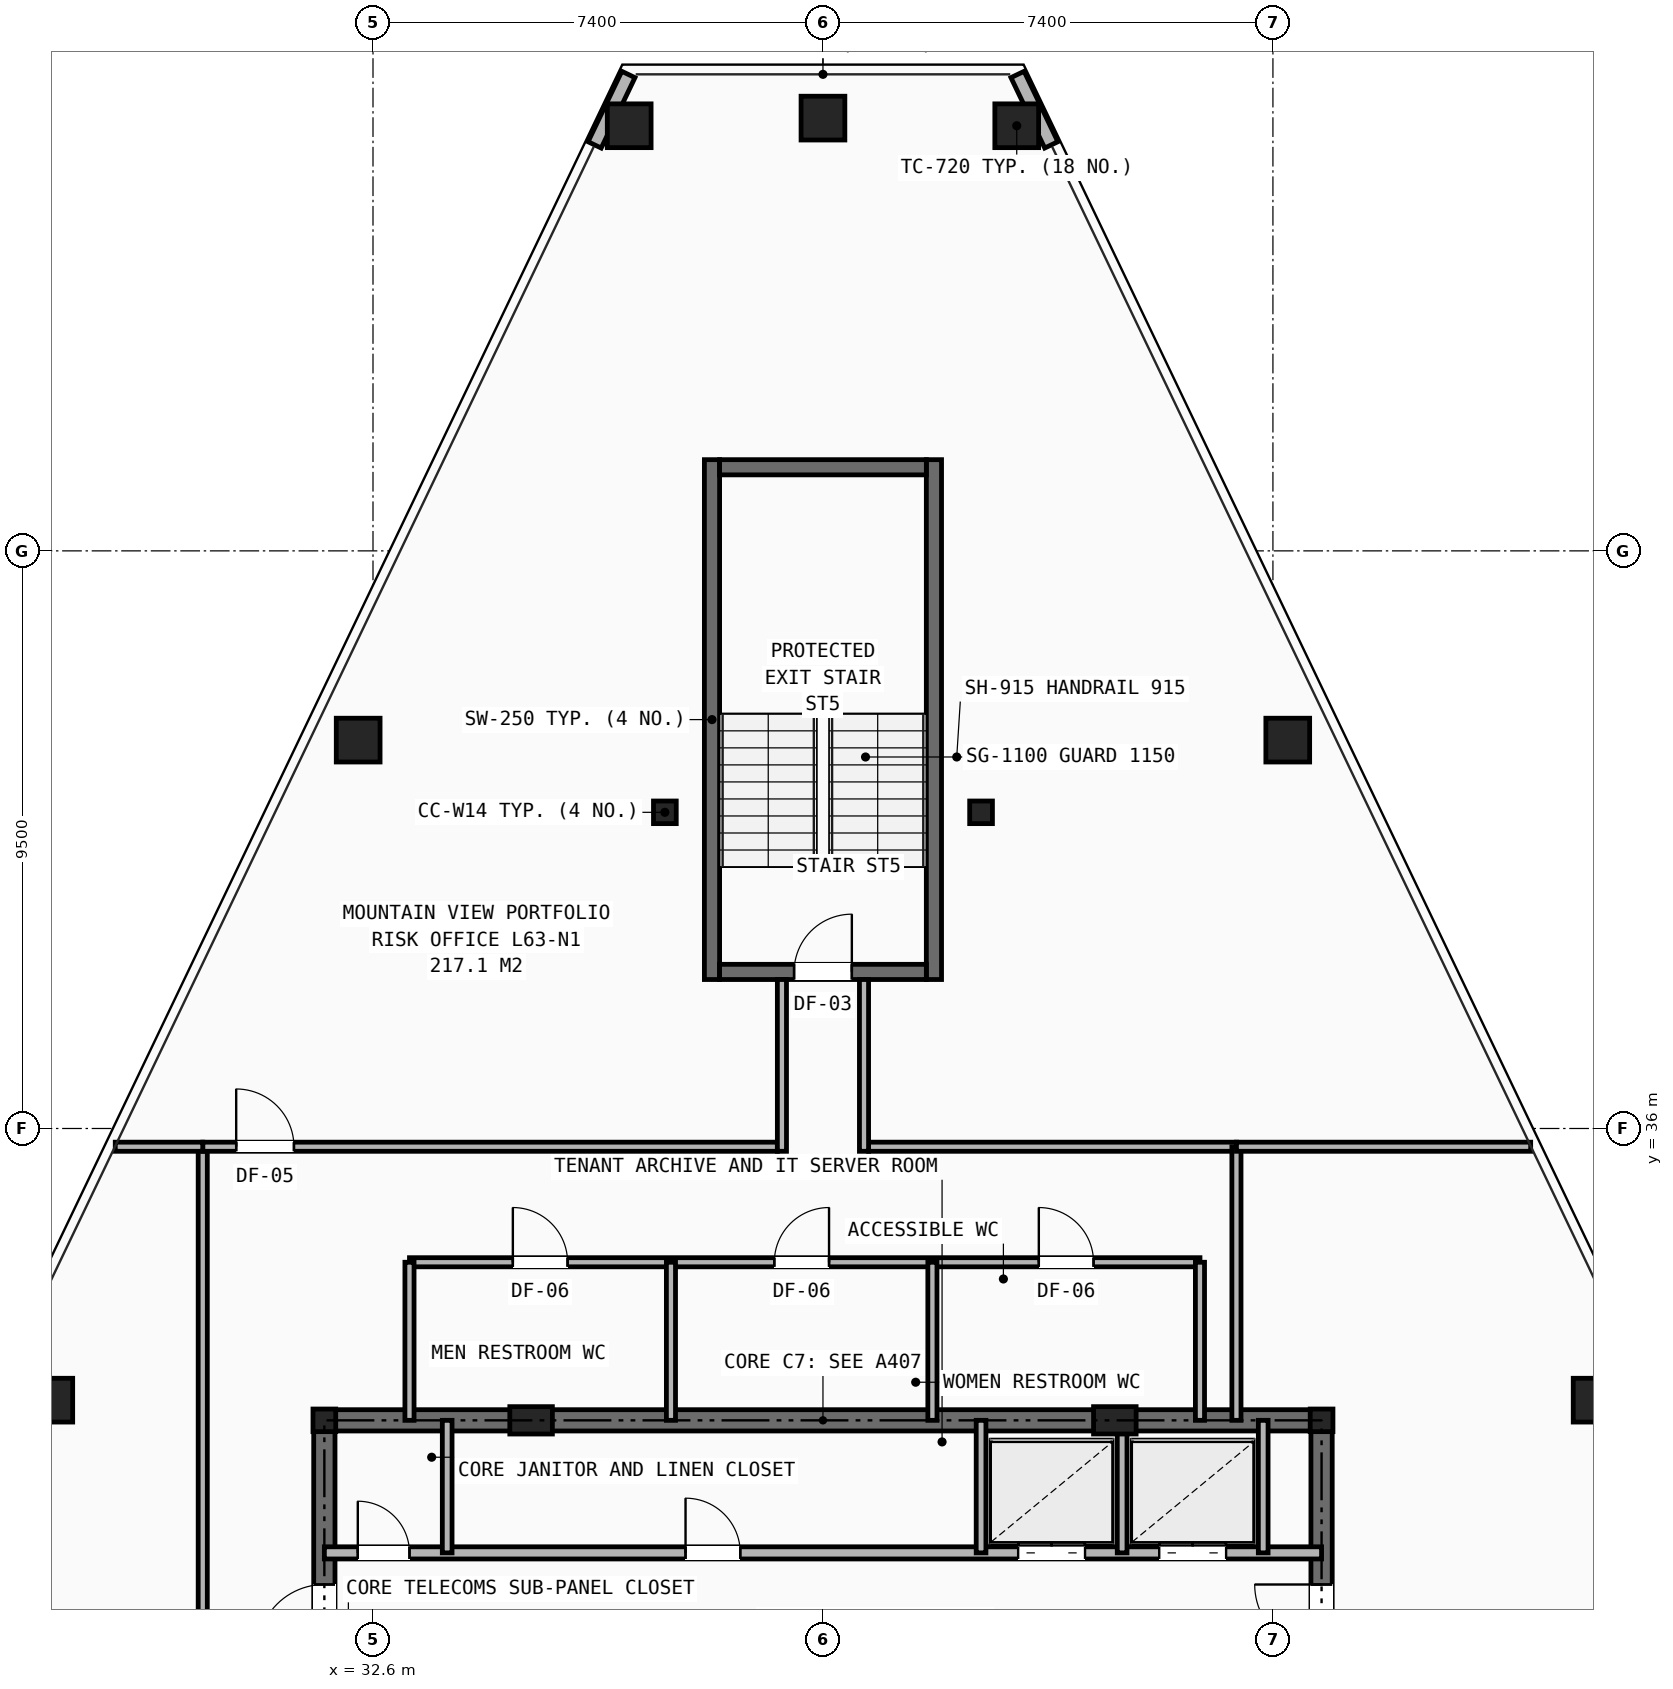
"""IFC4 building model, lengths in metres.
Left out: names, types, materials, properties, quantities, classifications, styles, units other than length and angle.
Written with IfcOpenShell. Run it as: python <this file> out.ifc"""

import sys

from ifc_helpers import new_model, si_unit, direction, frame, frame_2d, origin, origin_2d, place, context, subcontext, project, spatial, rectangle, hollow_rectangle, i_section, extrude, element, fill, save


model = new_model("IFC4")
c1 = context("Model", 3, precision=1e-05, world=origin(), true_north=direction((0.0, 1.0)))
c2 = subcontext(c1, "Body", "Model", "MODEL_VIEW")
j1 = project(units=[si_unit("LENGTHUNIT", "METRE"), si_unit("PLANEANGLEUNIT", "RADIAN")], contexts=[c1])
p1 = place(None, origin())
s1 = spatial("IfcSite", under=j1, at=p1, CompositionType="ELEMENT")
p2 = place(p1, origin())
s2 = spatial("IfcBuilding", under=s1, at=p2, CompositionType="ELEMENT")
p3 = place(p2, frame((0.0, 0.0, 222.4)))
s3 = spatial("IfcBuildingStorey", under=s2, at=p3, CompositionType="ELEMENT", Elevation=222.4)
for number, where, z_axis, x_axis in (
    (1, (31.8, 31.2, 0.0), (0.0, 0.0, 1.0), (1.0, 0.0, 0.0)),
    (2, (48.2, 31.2, 0.0), (0.0, 0.0, 1.0), (1.0, 0.0, 0.0)),
    (3, (37.4, 41.2, 0.0), (0.0, 0.0, 1.0), (1.0, 0.0, 0.0)),
    (4, (42.6, 41.2, 0.0), (0.0, 0.0, 1.0), (1.0, 0.0, 0.0)),
):
    element("IfcColumn", number, at=place(p3, frame(where, z_axis=z_axis, x_axis=x_axis)), inside=s3, PredefinedType="COLUMN", context=c2, shape_type="SweptSolid", body=[
        extrude(i_section(OverallWidth=0.374, OverallDepth=0.372, WebThickness=0.016, FlangeThickness=0.026, at=origin_2d()), origin(), (0.0, 0.0, 1.0), 3.5),
    ])
for number, where, z_axis, x_axis in (
    (5, (35.2, 31.2, 0.0), (0.0, 0.0, 1.0), (1.0, 0.0, 0.0)),
    (6, (44.8, 31.2, 0.0), (0.0, 0.0, 1.0), (1.0, 0.0, 0.0)),
):
    element("IfcColumn", number, at=place(p3, frame(where, z_axis=z_axis, x_axis=x_axis)), inside=s3, PredefinedType="PILASTER", context=c2, shape_type="SweptSolid", body=[
        extrude(rectangle(XDim=0.7, YDim=0.45, at=origin_2d()), origin(), (0.0, 0.0, 1.0), 3.5),
    ])
for number, where, z_axis, x_axis in (
    (7, (43.187, 52.492, 0.0), (0.0, 0.0, 1.0), (1.0, 0.0, 0.0)),
    (8, (40.0, 52.617, 0.0), (0.0, 0.0, 1.0), (1.0, 0.0, 0.0)),
    (9, (36.813, 52.492, 0.0), (0.0, 0.0, 1.0), (1.0, 0.0, 0.0)),
    (10, (32.356, 42.388, 0.0), (0.0, 0.0, 1.0), (1.0, 0.0, 0.0)),
    (11, (27.301, 31.532, 0.0), (0.0, 0.0, 1.0), (1.0, 0.0, 0.0)),
    (12, (52.699, 31.532, 0.0), (0.0, 0.0, 1.0), (1.0, 0.0, 0.0)),
    (13, (47.644, 42.388, 0.0), (0.0, 0.0, 1.0), (1.0, 0.0, 0.0)),
):
    element("IfcColumn", number, at=place(p3, frame(where, z_axis=z_axis, x_axis=x_axis)), inside=s3, PredefinedType="COLUMN", context=c2, shape_type="SweptSolid", body=[
        extrude(hollow_rectangle(XDim=0.72, YDim=0.72, WallThickness=0.05, at=origin_2d()), origin(), (0.0, 0.0, 1.0), 3.5),
    ])
for number, where, z_axis, x_axis in (
    (14, (36.8, 53.335, 0.0), (0.0, 0.0, 1.0), (-0.432, -0.902, 0.0)),
    (15, (43.755, 52.177, 0.0), (0.0, 0.0, 1.0), (-0.432, 0.902, 0.0)),
):
    element("IfcWall", number, at=place(p3, frame(where, z_axis=z_axis, x_axis=x_axis)), inside=s3, PredefinedType="SHEAR", context=c2, shape_type="SweptSolid", body=[
        extrude(rectangle(XDim=1.284, YDim=0.24, at=frame_2d((0.642, 0.0))), origin(), (0.0, 0.0, 1.0), 2.623),
    ])
p4 = place(p3, frame((31.8, 31.2, 0.0), z_axis=(0.0, 0.0, 1.0), x_axis=(1.0, 0.0, 0.0)))
e16 = element("IfcWall", 16, at=p4, inside=s3, PredefinedType="SHEAR", context=c2, shape_type="SweptSolid", body=[
    extrude(rectangle(XDim=16.4, YDim=0.35, at=frame_2d((8.2, 0.0))), origin(), (0.0, 0.0, 1.0), 3.25),
])
p5 = place(p3, frame((31.8, 16.4, 0.0), z_axis=(0.0, 0.0, 1.0), x_axis=(0.0, 1.0, 0.0)))
e17 = element("IfcWall", 17, at=p5, inside=s3, PredefinedType="SHEAR", context=c2, shape_type="SweptSolid", body=[
    extrude(rectangle(XDim=14.8, YDim=0.35, at=frame_2d((7.4, 0.0))), origin(), (0.0, 0.0, 1.0), 3.25),
])
p6 = place(p5, frame((11.0, 0.0, 0.0)))
e18 = element("IfcOpeningElement", 18, at=p6, cuts=e17, PredefinedType="OPENING", context=c2, shape_type="SweptSolid", body=[
    extrude(rectangle(XDim=1.1, YDim=2.15, at=frame_2d((0.55, 1.075))), frame((0.0, 0.185, 0.0), z_axis=(0.0, -1.0, 0.0), x_axis=(1.0, 0.0, 0.0)), (0.0, 0.0, 1.0), 0.37),
])
p7 = place(p3, frame((48.2, 16.4, 0.0), z_axis=(0.0, 0.0, 1.0), x_axis=(0.0, 1.0, 0.0)))
e19 = element("IfcWall", 19, at=p7, inside=s3, PredefinedType="SHEAR", context=c2, shape_type="SweptSolid", body=[
    extrude(rectangle(XDim=14.8, YDim=0.35, at=frame_2d((7.4, 0.0))), origin(), (0.0, 0.0, 1.0), 3.25),
])
p8 = place(p7, frame((11.0, 0.0, 0.0)))
e20 = element("IfcOpeningElement", 20, at=p8, cuts=e19, PredefinedType="OPENING", context=c2, shape_type="SweptSolid", body=[
    extrude(rectangle(XDim=1.1, YDim=2.15, at=frame_2d((0.55, 1.075))), frame((0.0, 0.185, 0.0), z_axis=(0.0, -1.0, 0.0), x_axis=(1.0, 0.0, 0.0)), (0.0, 0.0, 1.0), 0.37),
])
p9 = place(p3, frame((31.8, 29.02, 0.0), z_axis=(0.0, 0.0, 1.0), x_axis=(1.0, 0.0, 0.0)))
e21 = element("IfcWall", 21, at=p9, inside=s3, PredefinedType="SOLIDWALL", context=c2, shape_type="SweptSolid", body=[
    extrude(rectangle(XDim=16.4, YDim=0.2, at=frame_2d((8.2, 0.0))), origin(), (0.0, 0.0, 1.0), 2.705),
])
p10 = place(p9, frame((0.55, 0.0, 0.0)))
e22 = element("IfcOpeningElement", 22, at=p10, cuts=e21, PredefinedType="OPENING", context=c2, shape_type="SweptSolid", body=[
    extrude(rectangle(XDim=0.85, YDim=2.05, at=frame_2d((0.425, 1.025))), frame((0.0, 0.11, 0.0), z_axis=(0.0, -1.0, 0.0), x_axis=(1.0, 0.0, 0.0)), (0.0, 0.0, 1.0), 0.22),
])
p11 = place(p9, frame((5.94, 0.0, 0.0)))
e23 = element("IfcOpeningElement", 23, at=p11, cuts=e21, PredefinedType="OPENING", context=c2, shape_type="SweptSolid", body=[
    extrude(rectangle(XDim=0.9, YDim=2.1, at=frame_2d((0.45, 1.05))), frame((0.0, 0.11, 0.0), z_axis=(0.0, -1.0, 0.0), x_axis=(1.0, 0.0, 0.0)), (0.0, 0.0, 1.0), 0.22),
])
p12 = place(p9, frame((11.41, 0.0, 0.0)))
e24 = element("IfcOpeningElement", 24, at=p12, cuts=e21, PredefinedType="OPENING", context=c2, shape_type="SweptSolid", body=[
    extrude(rectangle(XDim=1.1, YDim=2.15, at=frame_2d((0.55, 1.075))), frame((0.0, 0.11, 0.0), z_axis=(0.0, -1.0, 0.0), x_axis=(1.0, 0.0, 0.0)), (0.0, 0.0, 1.0), 0.22),
])
p13 = place(p9, frame((13.73, 0.0, 0.0)))
e25 = element("IfcOpeningElement", 25, at=p13, cuts=e21, PredefinedType="OPENING", context=c2, shape_type="SweptSolid", body=[
    extrude(rectangle(XDim=1.1, YDim=2.15, at=frame_2d((0.55, 1.075))), frame((0.0, 0.11, 0.0), z_axis=(0.0, -1.0, 0.0), x_axis=(1.0, 0.0, 0.0)), (0.0, 0.0, 1.0), 0.22),
])
for number, where, z_axis, x_axis in (
    (26, (33.82, 29.02, 0.0), (0.0, 0.0, 1.0), (0.0, 1.0, 0.0)),
    (27, (42.6, 29.02, 0.0), (0.0, 0.0, 1.0), (0.0, 1.0, 0.0)),
    (28, (44.92, 29.02, 0.0), (0.0, 0.0, 1.0), (0.0, 1.0, 0.0)),
    (29, (47.24, 29.02, 0.0), (0.0, 0.0, 1.0), (0.0, 1.0, 0.0)),
):
    element("IfcWall", number, at=place(p3, frame(where, z_axis=z_axis, x_axis=x_axis)), inside=s3, PredefinedType="SOLIDWALL", context=c2, shape_type="SweptSolid", body=[
        extrude(rectangle(XDim=2.18, YDim=0.16, at=frame_2d((1.09, 0.0))), origin(), (0.0, 0.0, 1.0), 2.705),
    ])
p14 = place(p3, frame((33.2, 33.8, 0.0), z_axis=(0.0, 0.0, 1.0), x_axis=(1.0, 0.0, 0.0)))
e30 = element("IfcWall", 30, at=p14, inside=s3, PredefinedType="PARTITIONING", context=c2, shape_type="SweptSolid", body=[
    extrude(rectangle(XDim=13.0, YDim=0.15, at=frame_2d((6.5, 0.0))), origin(), (0.0, 0.0, 1.0), 3.25),
])
p15 = place(p14, frame((1.7, 0.0, 0.0)))
e31 = element("IfcOpeningElement", 31, at=p15, cuts=e30, PredefinedType="OPENING", context=c2, shape_type="SweptSolid", body=[
    extrude(rectangle(XDim=0.9, YDim=2.1, at=frame_2d((0.45, 1.05))), frame((0.0, 0.085, 0.0), z_axis=(0.0, -1.0, 0.0), x_axis=(1.0, 0.0, 0.0)), (0.0, 0.0, 1.0), 0.17),
])
p16 = place(p14, frame((6.0, 0.0, 0.0)))
e32 = element("IfcOpeningElement", 32, at=p16, cuts=e30, PredefinedType="OPENING", context=c2, shape_type="SweptSolid", body=[
    extrude(rectangle(XDim=0.9, YDim=2.1, at=frame_2d((0.45, 1.05))), frame((0.0, 0.085, 0.0), z_axis=(0.0, -1.0, 0.0), x_axis=(1.0, 0.0, 0.0)), (0.0, 0.0, 1.0), 0.17),
])
p17 = place(p14, frame((10.35, 0.0, 0.0)))
e33 = element("IfcOpeningElement", 33, at=p17, cuts=e30, PredefinedType="OPENING", context=c2, shape_type="SweptSolid", body=[
    extrude(rectangle(XDim=0.9, YDim=2.1, at=frame_2d((0.45, 1.05))), frame((0.0, 0.085, 0.0), z_axis=(0.0, -1.0, 0.0), x_axis=(1.0, 0.0, 0.0)), (0.0, 0.0, 1.0), 0.17),
])
for number, where, z_axis, x_axis in (
    (34, (33.2, 31.2, 0.0), (0.0, 0.0, 1.0), (0.0, 1.0, 0.0)),
    (35, (46.2, 31.2, 0.0), (0.0, 0.0, 1.0), (0.0, 1.0, 0.0)),
    (36, (37.5, 31.2, 0.0), (0.0, 0.0, 1.0), (0.0, 1.0, 0.0)),
    (37, (41.8, 31.2, 0.0), (0.0, 0.0, 1.0), (0.0, 1.0, 0.0)),
):
    element("IfcWall", number, at=place(p3, frame(where, z_axis=z_axis, x_axis=x_axis)), inside=s3, PredefinedType="PARTITIONING", context=c2, shape_type="SweptSolid", body=[
        extrude(rectangle(XDim=2.6, YDim=0.15, at=frame_2d((1.3, 0.0))), origin(), (0.0, 0.0, 1.0), 2.705),
    ])
p18 = place(p3, frame((29.8, 16.4, 0.0), z_axis=(0.0, 0.0, 1.0), x_axis=(0.0, 1.0, 0.0)))
e38 = element("IfcWall", 38, at=p18, inside=s3, PredefinedType="PARTITIONING", context=c2, shape_type="SweptSolid", body=[
    extrude(rectangle(XDim=19.3, YDim=0.15, at=frame_2d((9.65, 0.0))), origin(), (0.0, 0.0, 1.0), 2.265),
])
p19 = place(p18, frame((0.35, 0.0, 0.0)))
e39 = element("IfcOpeningElement", 39, at=p19, cuts=e38, PredefinedType="OPENING", context=c2, shape_type="SweptSolid", body=[
    extrude(rectangle(XDim=0.95, YDim=2.1, at=frame_2d((0.475, 1.05))), frame((0.0, 0.085, 0.0), z_axis=(0.0, -1.0, 0.0), x_axis=(1.0, 0.0, 0.0)), (0.0, 0.0, 1.0), 0.17),
])
p20 = place(p18, frame((10.45, 0.0, 0.0)))
e40 = element("IfcOpeningElement", 40, at=p20, cuts=e38, PredefinedType="OPENING", context=c2, shape_type="SweptSolid", body=[
    extrude(rectangle(XDim=0.95, YDim=2.1, at=frame_2d((0.475, 1.05))), frame((0.0, 0.085, 0.0), z_axis=(0.0, -1.0, 0.0), x_axis=(1.0, 0.0, 0.0)), (0.0, 0.0, 1.0), 0.17),
])
p21 = place(p3, frame((29.8, 35.7, 0.0), z_axis=(0.0, 0.0, 1.0), x_axis=(1.0, 0.0, 0.0)))
e41 = element("IfcWall", 41, at=p21, inside=s3, PredefinedType="PARTITIONING", context=c2, shape_type="SweptSolid", body=[
    extrude(rectangle(XDim=9.45, YDim=0.15, at=frame_2d((4.725, 0.0))), origin(), (0.0, 0.0, 1.0), 2.833),
])
p22 = place(p21, frame((0.55, 0.0, 0.0)))
e42 = element("IfcOpeningElement", 42, at=p22, cuts=e41, PredefinedType="OPENING", context=c2, shape_type="SweptSolid", body=[
    extrude(rectangle(XDim=0.95, YDim=2.1, at=frame_2d((0.475, 1.05))), frame((0.0, 0.085, 0.0), z_axis=(0.0, -1.0, 0.0), x_axis=(1.0, 0.0, 0.0)), (0.0, 0.0, 1.0), 0.17),
])
p23 = place(p3, frame((40.75, 35.7, 0.0), z_axis=(0.0, 0.0, 1.0), x_axis=(1.0, 0.0, 0.0)))
e43 = element("IfcWall", 43, at=p23, inside=s3, PredefinedType="PARTITIONING", context=c2, shape_type="SweptSolid", body=[
    extrude(rectangle(XDim=6.05, YDim=0.15, at=frame_2d((3.025, 0.0))), origin(), (0.0, 0.0, 1.0), 3.25),
])
p24 = place(p3, frame((46.8, 31.2, 0.0), z_axis=(0.0, 0.0, 1.0), x_axis=(0.0, 1.0, 0.0)))
e44 = element("IfcWall", 44, at=p24, inside=s3, PredefinedType="PARTITIONING", context=c2, shape_type="SweptSolid", body=[
    extrude(rectangle(XDim=4.5, YDim=0.15, at=frame_2d((2.25, 0.0))), origin(), (0.0, 0.0, 1.0), 2.705),
])
p25 = place(p3, frame((28.361, 35.7, 0.0), z_axis=(0.0, 0.0, 1.0), x_axis=(1.0, 0.0, 0.0)))
e45 = element("IfcWall", 45, at=p25, inside=s3, PredefinedType="PARTITIONING", context=c2, shape_type="SweptSolid", body=[
    extrude(rectangle(XDim=1.439, YDim=0.15, at=frame_2d((0.719, 0.0))), origin(), (0.0, 0.0, 1.0), 2.628),
])
p26 = place(p3, frame((46.8, 35.7, 0.0), z_axis=(0.0, 0.0, 1.0), x_axis=(1.0, 0.0, 0.0)))
e46 = element("IfcWall", 46, at=p26, inside=s3, PredefinedType="PARTITIONING", context=c2, shape_type="SweptSolid", body=[
    extrude(rectangle(XDim=4.839, YDim=0.15, at=frame_2d((2.419, 0.0))), origin(), (0.0, 0.0, 1.0), 2.628),
])
for number, where, z_axis, x_axis in (
    (47, (38.175, 38.45, 0.0), (0.0, 0.0, 1.0), (0.0, 1.0, 0.0)),
    (48, (41.825, 38.45, 0.0), (0.0, 0.0, 1.0), (0.0, 1.0, 0.0)),
):
    element("IfcWall", number, at=place(p3, frame(where, z_axis=z_axis, x_axis=x_axis)), inside=s3, PredefinedType="SHEAR", context=c2, shape_type="SweptSolid", body=[
        extrude(rectangle(XDim=8.55, YDim=0.25, at=frame_2d((4.275, 0.0))), origin(), (0.0, 0.0, 1.0), 3.25),
    ])
p27 = place(p3, frame((38.3, 38.575, 0.0), z_axis=(0.0, 0.0, 1.0), x_axis=(1.0, 0.0, 0.0)))
e49 = element("IfcWall", 49, at=p27, inside=s3, PredefinedType="SHEAR", context=c2, shape_type="SweptSolid", body=[
    extrude(rectangle(XDim=3.4, YDim=0.25, at=frame_2d((1.7, 0.0))), origin(), (0.0, 0.0, 1.0), 3.25),
])
p28 = place(p27, frame((1.225, 0.0, 0.0)))
e50 = element("IfcOpeningElement", 50, at=p28, cuts=e49, PredefinedType="OPENING", context=c2, shape_type="SweptSolid", body=[
    extrude(rectangle(XDim=0.95, YDim=2.1, at=frame_2d((0.475, 1.05))), frame((0.0, 0.135, 0.0), z_axis=(0.0, -1.0, 0.0), x_axis=(1.0, 0.0, 0.0)), (0.0, 0.0, 1.0), 0.27),
])
p29 = place(p3, frame((38.3, 46.875, 0.0), z_axis=(0.0, 0.0, 1.0), x_axis=(1.0, 0.0, 0.0)))
e51 = element("IfcWall", 51, at=p29, inside=s3, PredefinedType="SHEAR", context=c2, shape_type="SweptSolid", body=[
    extrude(rectangle(XDim=3.4, YDim=0.25, at=frame_2d((1.7, 0.0))), origin(), (0.0, 0.0, 1.0), 3.25),
])
for number, where, z_axis, x_axis in (
    (52, (39.325, 35.625, 0.0), (0.0, 0.0, 1.0), (0.0, 1.0, 0.0)),
    (53, (40.675, 35.625, 0.0), (0.0, 0.0, 1.0), (0.0, 1.0, 0.0)),
):
    element("IfcWall", number, at=place(p3, frame(where, z_axis=z_axis, x_axis=x_axis)), inside=s3, PredefinedType="PARTITIONING", context=c2, shape_type="SweptSolid", body=[
        extrude(rectangle(XDim=2.825, YDim=0.15, at=frame_2d((1.413, 0.0))), origin(), (0.0, 0.0, 1.0), 3.25),
    ])
p30 = place(p10, origin())
e54 = element("IfcDoor", 54, at=p30, inside=s3, OperationType="SINGLE_SWING_LEFT", PredefinedType="DOOR", context=c2, shape_type="SweptSolid", body=[
    extrude(rectangle(XDim=0.85, YDim=2.05, at=frame_2d((0.425, 1.025))), frame((0.0, 0.025, 0.0), z_axis=(0.0, -1.0, 0.0), x_axis=(1.0, 0.0, 0.0)), (0.0, 0.0, 1.0), 0.05),
])
fill(e22, e54)
p31 = place(p6, origin())
e55 = element("IfcDoor", 55, at=p31, inside=s3, OperationType="SINGLE_SWING_LEFT", PredefinedType="DOOR", context=c2, shape_type="SweptSolid", body=[
    extrude(rectangle(XDim=1.1, YDim=2.15, at=frame_2d((0.55, 1.075))), frame((0.0, 0.025, 0.0), z_axis=(0.0, -1.0, 0.0), x_axis=(1.0, 0.0, 0.0)), (0.0, 0.0, 1.0), 0.05),
])
fill(e18, e55)
p32 = place(p8, origin())
e56 = element("IfcDoor", 56, at=p32, inside=s3, OperationType="SINGLE_SWING_RIGHT", PredefinedType="DOOR", context=c2, shape_type="SweptSolid", body=[
    extrude(rectangle(XDim=1.1, YDim=2.15, at=frame_2d((0.55, 1.075))), frame((0.0, 0.025, 0.0), z_axis=(0.0, -1.0, 0.0), x_axis=(1.0, 0.0, 0.0)), (0.0, 0.0, 1.0), 0.05),
])
fill(e20, e56)
p33 = place(p11, origin())
e57 = element("IfcDoor", 57, at=p33, inside=s3, OperationType="SINGLE_SWING_LEFT", PredefinedType="DOOR", context=c2, shape_type="SweptSolid", body=[
    extrude(rectangle(XDim=0.9, YDim=2.1, at=frame_2d((0.45, 1.05))), frame((0.0, 0.025, 0.0), z_axis=(0.0, -1.0, 0.0), x_axis=(1.0, 0.0, 0.0)), (0.0, 0.0, 1.0), 0.05),
])
fill(e23, e57)
p34 = place(p12, origin())
e58 = element("IfcDoor", 58, at=p34, inside=s3, OperationType="DOUBLE_DOOR_SLIDING", PredefinedType="DOOR", context=c2, shape_type="SweptSolid", body=[
    extrude(rectangle(XDim=1.1, YDim=2.15, at=frame_2d((0.55, 1.075))), frame((0.0, 0.025, 0.0), z_axis=(0.0, -1.0, 0.0), x_axis=(1.0, 0.0, 0.0)), (0.0, 0.0, 1.0), 0.05),
])
fill(e24, e58)
p35 = place(p13, origin())
e59 = element("IfcDoor", 59, at=p35, inside=s3, OperationType="DOUBLE_DOOR_SLIDING", PredefinedType="DOOR", context=c2, shape_type="SweptSolid", body=[
    extrude(rectangle(XDim=1.1, YDim=2.15, at=frame_2d((0.55, 1.075))), frame((0.0, 0.025, 0.0), z_axis=(0.0, -1.0, 0.0), x_axis=(1.0, 0.0, 0.0)), (0.0, 0.0, 1.0), 0.05),
])
fill(e25, e59)
p36 = place(p15, origin())
e60 = element("IfcDoor", 60, at=p36, inside=s3, OperationType="SINGLE_SWING_LEFT", PredefinedType="DOOR", context=c2, shape_type="SweptSolid", body=[
    extrude(rectangle(XDim=0.9, YDim=2.1, at=frame_2d((0.45, 1.05))), frame((0.0, 0.025, 0.0), z_axis=(0.0, -1.0, 0.0), x_axis=(1.0, 0.0, 0.0)), (0.0, 0.0, 1.0), 0.05),
])
fill(e31, e60)
p37 = place(p16, origin())
e61 = element("IfcDoor", 61, at=p37, inside=s3, OperationType="SINGLE_SWING_RIGHT", PredefinedType="DOOR", context=c2, shape_type="SweptSolid", body=[
    extrude(rectangle(XDim=0.9, YDim=2.1, at=frame_2d((0.45, 1.05))), frame((0.0, 0.025, 0.0), z_axis=(0.0, -1.0, 0.0), x_axis=(1.0, 0.0, 0.0)), (0.0, 0.0, 1.0), 0.05),
])
fill(e32, e61)
p38 = place(p17, origin())
e62 = element("IfcDoor", 62, at=p38, inside=s3, OperationType="SINGLE_SWING_LEFT", PredefinedType="DOOR", context=c2, shape_type="SweptSolid", body=[
    extrude(rectangle(XDim=0.9, YDim=2.1, at=frame_2d((0.45, 1.05))), frame((0.0, 0.025, 0.0), z_axis=(0.0, -1.0, 0.0), x_axis=(1.0, 0.0, 0.0)), (0.0, 0.0, 1.0), 0.05),
])
fill(e33, e62)
p39 = place(p22, origin())
e63 = element("IfcDoor", 63, at=p39, inside=s3, OperationType="SINGLE_SWING_LEFT", PredefinedType="DOOR", context=c2, shape_type="SweptSolid", body=[
    extrude(rectangle(XDim=0.95, YDim=2.1, at=frame_2d((0.475, 1.05))), frame((0.0, 0.025, 0.0), z_axis=(0.0, -1.0, 0.0), x_axis=(1.0, 0.0, 0.0)), (0.0, 0.0, 1.0), 0.05),
])
fill(e42, e63)
p40 = place(p28, origin())
e64 = element("IfcDoor", 64, at=p40, inside=s3, OperationType="SINGLE_SWING_RIGHT", PredefinedType="DOOR", context=c2, shape_type="SweptSolid", body=[
    extrude(rectangle(XDim=0.95, YDim=2.1, at=frame_2d((0.475, 1.05))), frame((0.0, 0.025, 0.0), z_axis=(0.0, -1.0, 0.0), x_axis=(1.0, 0.0, 0.0)), (0.0, 0.0, 1.0), 0.05),
])
fill(e50, e64)
save(model, sys.argv[1])
